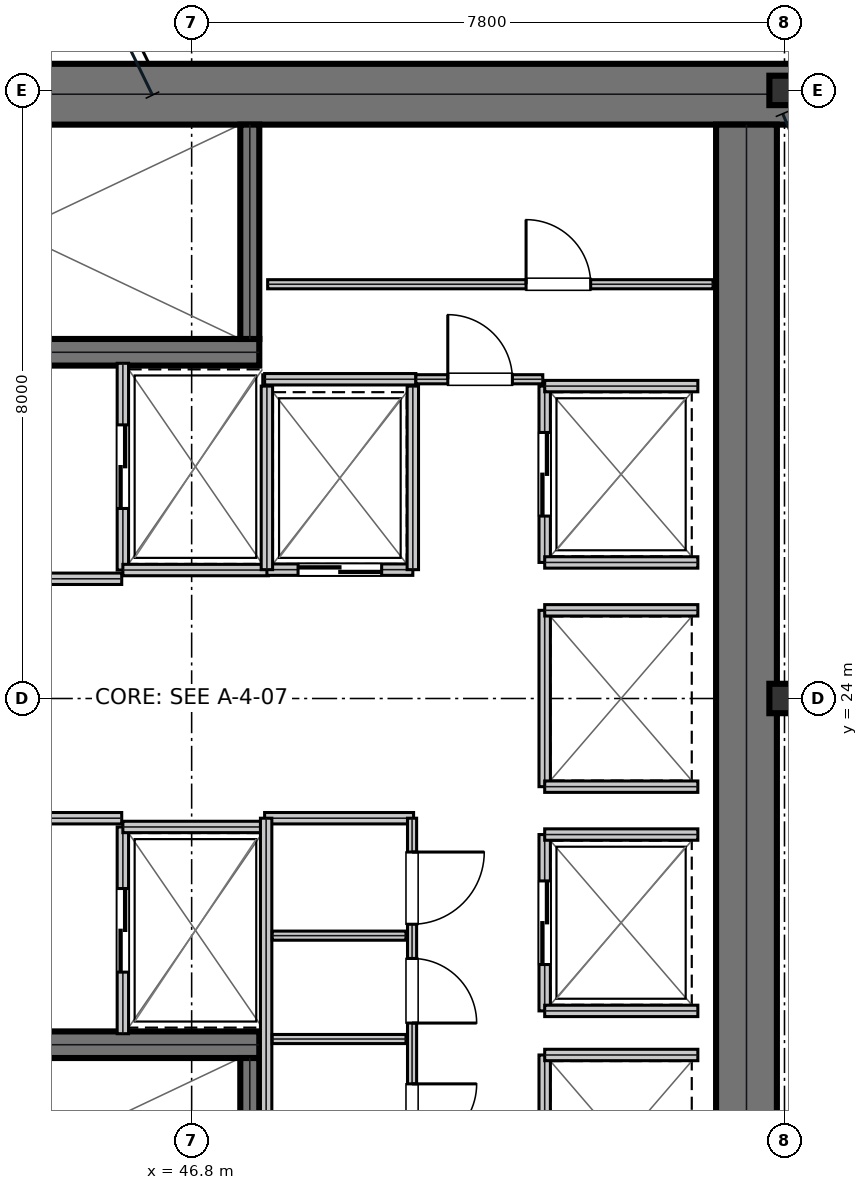
"""IFC4 building model, lengths in metres.
Left out: names, types, materials, properties, quantities, classifications, styles, units other than length and angle.
Written with IfcOpenShell. Run it as: python <this file> out.ifc"""

import sys

from ifc_helpers import new_model, si_unit, direction, frame, frame_2d, origin, origin_2d, place, context, subcontext, project, spatial, rectangle, i_section, extrude, element, fill, save


model = new_model("IFC4")
c1 = context("Model", 3, precision=1e-05, world=origin(), true_north=direction((0.0, 1.0)))
c2 = subcontext(c1, "Body", "Model", "MODEL_VIEW")
j1 = project(units=[si_unit("LENGTHUNIT", "METRE"), si_unit("PLANEANGLEUNIT", "RADIAN")], contexts=[c1])
p1 = place(None, origin())
s1 = spatial("IfcSite", under=j1, at=p1, CompositionType="ELEMENT")
p2 = place(p1, origin())
s2 = spatial("IfcBuilding", under=s1, at=p2, CompositionType="ELEMENT")
p3 = place(p2, frame((0.0, 0.0, 120.9)))
s3 = spatial("IfcBuildingStorey", under=s2, at=p3, CompositionType="ELEMENT", Elevation=120.9)
p4 = place(p3, frame((38.8, 31.95, 0.0), z_axis=(0.0, 0.0, 1.0), x_axis=(1.0, 0.0, 0.0)))
e1 = element("IfcWall", 1, at=p4, inside=s3, PredefinedType="SHEAR", context=c2, shape_type="SweptSolid", body=[
    extrude(rectangle(XDim=16.0, YDim=0.8, at=frame_2d((8.0, 0.0))), origin(), (0.0, 0.0, 1.0), 3.81),
])
p5 = place(p3, frame((54.1, 16.45, 0.0), z_axis=(0.0, 0.0, 1.0), x_axis=(0.0, 1.0, 0.0)))
e2 = element("IfcWall", 2, at=p5, inside=s3, PredefinedType="SHEAR", context=c2, shape_type="SweptSolid", body=[
    extrude(rectangle(XDim=15.1, YDim=0.8, at=frame_2d((7.55, 0.0))), origin(), (0.0, 0.0, 1.0), 3.81),
])
p6 = place(p3, frame((39.98, 28.555, 0.0), z_axis=(0.0, 0.0, 1.0), x_axis=(1.0, 0.0, 0.0)))
e3 = element("IfcWall", 3, at=p6, inside=s3, PredefinedType="SHEAR", context=c2, shape_type="SweptSolid", body=[
    extrude(rectangle(XDim=7.71, YDim=0.35, at=frame_2d((3.855, 0.0))), origin(), (0.0, 0.0, 1.0), 3.81),
])
p7 = place(p6, frame((0.25, 0.0, 0.0)))
e4 = element("IfcOpeningElement", 4, at=p7, cuts=e3, PredefinedType="OPENING", context=c2, shape_type="SweptSolid", body=[
    extrude(rectangle(XDim=1.1, YDim=2.15, at=frame_2d((0.55, 1.075))), frame((0.0, 0.185, 0.0), z_axis=(0.0, -1.0, 0.0), x_axis=(1.0, 0.0, 0.0)), (0.0, 0.0, 1.0), 0.37),
])
p8 = place(p3, frame((39.98, 19.445, 0.0), z_axis=(0.0, 0.0, 1.0), x_axis=(1.0, 0.0, 0.0)))
e5 = element("IfcWall", 5, at=p8, inside=s3, PredefinedType="SHEAR", context=c2, shape_type="SweptSolid", body=[
    extrude(rectangle(XDim=7.71, YDim=0.35, at=frame_2d((3.855, 0.0))), origin(), (0.0, 0.0, 1.0), 3.81),
])
p9 = place(p8, frame((0.25, 0.0, 0.0)))
e6 = element("IfcOpeningElement", 6, at=p9, cuts=e5, PredefinedType="OPENING", context=c2, shape_type="SweptSolid", body=[
    extrude(rectangle(XDim=1.1, YDim=2.15, at=frame_2d((0.55, 1.075))), frame((0.0, 0.185, 0.0), z_axis=(0.0, -1.0, 0.0), x_axis=(1.0, 0.0, 0.0)), (0.0, 0.0, 1.0), 0.37),
])
for number, where, z_axis, x_axis in (
    (7, (47.565, 28.73, 0.0), (0.0, 0.0, 1.0), (0.0, 1.0, 0.0)),
    (8, (47.565, 16.45, 0.0), (0.0, 0.0, 1.0), (0.0, 1.0, 0.0)),
):
    element("IfcWall", number, at=place(p3, frame(where, z_axis=z_axis, x_axis=x_axis)), inside=s3, PredefinedType="SHEAR", context=c2, shape_type="SweptSolid", body=[
        extrude(rectangle(XDim=2.82, YDim=0.25, at=frame_2d((1.41, 0.0))), origin(), (0.0, 0.0, 1.0), 3.81),
    ])
for number, where, z_axis, x_axis in (
    (9, (54.6, 24.0, 0.0), (0.0, 0.0, 1.0), (1.0, 0.0, 0.0)),
    (10, (54.6, 32.0, 0.0), (0.0, 0.0, 1.0), (1.0, 0.0, 0.0)),
):
    element("IfcColumn", number, at=place(p3, frame(where, z_axis=z_axis, x_axis=x_axis)), inside=s3, PredefinedType="COLUMN", context=c2, shape_type="SweptSolid", body=[
        extrude(i_section(OverallWidth=0.398, OverallDepth=0.387, WebThickness=0.021, FlangeThickness=0.033, at=origin_2d()), origin(), (0.0, 0.0, 1.0), 4.044),
    ])
p10 = place(p3, frame((39.98, 25.575, 0.0), z_axis=(0.0, 0.0, 1.0), x_axis=(1.0, 0.0, 0.0)))
e11 = element("IfcWall", 11, at=p10, inside=s3, PredefinedType="PARTITIONING", context=c2, shape_type="SweptSolid", body=[
    extrude(rectangle(XDim=5.9, YDim=0.15, at=frame_2d((2.95, 0.0))), origin(), (0.0, 0.0, 1.0), 3.81),
])
p11 = place(p10, frame((2.35, 0.0, 0.0)))
e12 = element("IfcOpeningElement", 12, at=p11, cuts=e11, PredefinedType="OPENING", context=c2, shape_type="SweptSolid", body=[
    extrude(rectangle(XDim=1.05, YDim=2.15, at=frame_2d((0.525, 1.075))), frame((0.0, 0.085, 0.0), z_axis=(0.0, -1.0, 0.0), x_axis=(1.0, 0.0, 0.0)), (0.0, 0.0, 1.0), 0.17),
])
p12 = place(p3, frame((39.98, 22.425, 0.0), z_axis=(0.0, 0.0, 1.0), x_axis=(1.0, 0.0, 0.0)))
e13 = element("IfcWall", 13, at=p12, inside=s3, PredefinedType="PARTITIONING", context=c2, shape_type="SweptSolid", body=[
    extrude(rectangle(XDim=5.9, YDim=0.15, at=frame_2d((2.95, 0.0))), origin(), (0.0, 0.0, 1.0), 3.81),
])
p13 = place(p12, frame((2.35, 0.0, 0.0)))
e14 = element("IfcOpeningElement", 14, at=p13, cuts=e13, PredefinedType="OPENING", context=c2, shape_type="SweptSolid", body=[
    extrude(rectangle(XDim=1.05, YDim=2.15, at=frame_2d((0.525, 1.075))), frame((0.0, 0.085, 0.0), z_axis=(0.0, -1.0, 0.0), x_axis=(1.0, 0.0, 0.0)), (0.0, 0.0, 1.0), 0.17),
])
p14 = place(p3, frame((45.895, 25.69, 0.0), z_axis=(0.0, 0.0, 1.0), x_axis=(0.0, 1.0, 0.0)))
e15 = element("IfcWall", 15, at=p14, inside=s3, PredefinedType="PARTITIONING", context=c2, shape_type="SweptSolid", body=[
    extrude(rectangle(XDim=2.72, YDim=0.15, at=frame_2d((1.36, 0.0))), origin(), (0.0, 0.0, 1.0), 3.81),
])
p15 = place(p14, frame((0.81, 0.0, 0.0)))
e16 = element("IfcOpeningElement", 16, at=p15, cuts=e15, PredefinedType="OPENING", context=c2, shape_type="SweptSolid", body=[
    extrude(rectangle(XDim=1.1, YDim=2.15, at=frame_2d((0.55, 1.075))), frame((0.0, 0.085, 0.0), z_axis=(0.0, -1.0, 0.0), x_axis=(1.0, 0.0, 0.0)), (0.0, 0.0, 1.0), 0.17),
])
p16 = place(p3, frame((45.895, 25.69, 0.0), z_axis=(0.0, 0.0, 1.0), x_axis=(1.0, 0.0, 0.0)))
e17 = element("IfcWall", 17, at=p16, inside=s3, PredefinedType="PARTITIONING", context=c2, shape_type="SweptSolid", body=[
    extrude(rectangle(XDim=1.915, YDim=0.15, at=frame_2d((0.958, 0.0))), origin(), (0.0, 0.0, 1.0), 3.81),
])
p17 = place(p3, frame((45.895, 19.59, 0.0), z_axis=(0.0, 0.0, 1.0), x_axis=(0.0, 1.0, 0.0)))
e18 = element("IfcWall", 18, at=p17, inside=s3, PredefinedType="PARTITIONING", context=c2, shape_type="SweptSolid", body=[
    extrude(rectangle(XDim=2.72, YDim=0.15, at=frame_2d((1.36, 0.0))), origin(), (0.0, 0.0, 1.0), 3.81),
])
p18 = place(p17, frame((0.81, 0.0, 0.0)))
e19 = element("IfcOpeningElement", 19, at=p18, cuts=e18, PredefinedType="OPENING", context=c2, shape_type="SweptSolid", body=[
    extrude(rectangle(XDim=1.1, YDim=2.15, at=frame_2d((0.55, 1.075))), frame((0.0, 0.085, 0.0), z_axis=(0.0, -1.0, 0.0), x_axis=(1.0, 0.0, 0.0)), (0.0, 0.0, 1.0), 0.17),
])
p19 = place(p3, frame((45.895, 22.31, 0.0), z_axis=(0.0, 0.0, 1.0), x_axis=(1.0, 0.0, 0.0)))
e20 = element("IfcWall", 20, at=p19, inside=s3, PredefinedType="PARTITIONING", context=c2, shape_type="SweptSolid", body=[
    extrude(rectangle(XDim=1.915, YDim=0.15, at=frame_2d((0.958, 0.0))), origin(), (0.0, 0.0, 1.0), 3.81),
])
p20 = place(p3, frame((47.79, 25.695, 0.0), z_axis=(0.0, 0.0, 1.0), x_axis=(1.0, 0.0, 0.0)))
e21 = element("IfcWall", 21, at=p20, inside=s3, PredefinedType="PARTITIONING", context=c2, shape_type="SweptSolid", body=[
    extrude(rectangle(XDim=1.92, YDim=0.15, at=frame_2d((0.96, 0.0))), origin(), (0.0, 0.0, 1.0), 3.81),
])
p21 = place(p20, frame((0.41, 0.0, 0.0)))
e22 = element("IfcOpeningElement", 22, at=p21, cuts=e21, PredefinedType="OPENING", context=c2, shape_type="SweptSolid", body=[
    extrude(rectangle(XDim=1.1, YDim=2.15, at=frame_2d((0.55, 1.075))), frame((0.0, 0.085, 0.0), z_axis=(0.0, -1.0, 0.0), x_axis=(1.0, 0.0, 0.0)), (0.0, 0.0, 1.0), 0.17),
])
for number, where, z_axis, x_axis in (
    (23, (47.79, 25.695, 0.0), (0.0, 0.0, 1.0), (0.0, 1.0, 0.0)),
    (24, (49.71, 25.695, 0.0), (0.0, 0.0, 1.0), (0.0, 1.0, 0.0)),
):
    element("IfcWall", number, at=place(p3, frame(where, z_axis=z_axis, x_axis=x_axis)), inside=s3, PredefinedType="PARTITIONING", context=c2, shape_type="SweptSolid", body=[
        extrude(rectangle(XDim=2.415, YDim=0.15, at=frame_2d((1.208, 0.0))), origin(), (0.0, 0.0, 1.0), 3.81),
    ])
p22 = place(p3, frame((51.445, 25.79, 0.0), z_axis=(0.0, 0.0, 1.0), x_axis=(0.0, 1.0, 0.0)))
e25 = element("IfcWall", 25, at=p22, inside=s3, PredefinedType="PARTITIONING", context=c2, shape_type="SweptSolid", body=[
    extrude(rectangle(XDim=2.32, YDim=0.15, at=frame_2d((1.16, 0.0))), origin(), (0.0, 0.0, 1.0), 3.81),
])
p23 = place(p22, frame((0.61, 0.0, 0.0)))
e26 = element("IfcOpeningElement", 26, at=p23, cuts=e25, PredefinedType="OPENING", context=c2, shape_type="SweptSolid", body=[
    extrude(rectangle(XDim=1.1, YDim=2.15, at=frame_2d((0.55, 1.075))), frame((0.0, 0.085, 0.0), z_axis=(0.0, -1.0, 0.0), x_axis=(1.0, 0.0, 0.0)), (0.0, 0.0, 1.0), 0.17),
])
for number, where, z_axis, x_axis in (
    (27, (51.445, 25.79, 0.0), (0.0, 0.0, 1.0), (1.0, 0.0, 0.0)),
    (28, (51.445, 28.11, 0.0), (0.0, 0.0, 1.0), (1.0, 0.0, 0.0)),
):
    element("IfcWall", number, at=place(p3, frame(where, z_axis=z_axis, x_axis=x_axis)), inside=s3, PredefinedType="PARTITIONING", context=c2, shape_type="SweptSolid", body=[
        extrude(rectangle(XDim=2.015, YDim=0.15, at=frame_2d((1.007, 0.0))), origin(), (0.0, 0.0, 1.0), 3.81),
    ])
p24 = place(p3, frame((51.445, 19.89, 0.0), z_axis=(0.0, 0.0, 1.0), x_axis=(0.0, 1.0, 0.0)))
e29 = element("IfcWall", 29, at=p24, inside=s3, PredefinedType="PARTITIONING", context=c2, shape_type="SweptSolid", body=[
    extrude(rectangle(XDim=2.32, YDim=0.15, at=frame_2d((1.16, 0.0))), origin(), (0.0, 0.0, 1.0), 3.81),
])
p25 = place(p24, frame((0.61, 0.0, 0.0)))
e30 = element("IfcOpeningElement", 30, at=p25, cuts=e29, PredefinedType="OPENING", context=c2, shape_type="SweptSolid", body=[
    extrude(rectangle(XDim=1.1, YDim=2.15, at=frame_2d((0.55, 1.075))), frame((0.0, 0.085, 0.0), z_axis=(0.0, -1.0, 0.0), x_axis=(1.0, 0.0, 0.0)), (0.0, 0.0, 1.0), 0.17),
])
for number, where, z_axis, x_axis in (
    (31, (51.445, 19.89, 0.0), (0.0, 0.0, 1.0), (1.0, 0.0, 0.0)),
    (32, (51.445, 22.21, 0.0), (0.0, 0.0, 1.0), (1.0, 0.0, 0.0)),
):
    element("IfcWall", number, at=place(p3, frame(where, z_axis=z_axis, x_axis=x_axis)), inside=s3, PredefinedType="PARTITIONING", context=c2, shape_type="SweptSolid", body=[
        extrude(rectangle(XDim=2.015, YDim=0.15, at=frame_2d((1.007, 0.0))), origin(), (0.0, 0.0, 1.0), 3.81),
    ])
p26 = place(p3, frame((51.445, 22.84, 0.0), z_axis=(0.0, 0.0, 1.0), x_axis=(0.0, 1.0, 0.0)))
e33 = element("IfcWall", 33, at=p26, inside=s3, PredefinedType="PARTITIONING", context=c2, shape_type="SweptSolid", body=[
    extrude(rectangle(XDim=2.32, YDim=0.15, at=frame_2d((1.16, 0.0))), origin(), (0.0, 0.0, 1.0), 3.81),
])
for number, where, z_axis, x_axis in (
    (34, (51.445, 22.84, 0.0), (0.0, 0.0, 1.0), (1.0, 0.0, 0.0)),
    (35, (51.445, 25.16, 0.0), (0.0, 0.0, 1.0), (1.0, 0.0, 0.0)),
):
    element("IfcWall", number, at=place(p3, frame(where, z_axis=z_axis, x_axis=x_axis)), inside=s3, PredefinedType="PARTITIONING", context=c2, shape_type="SweptSolid", body=[
        extrude(rectangle(XDim=2.015, YDim=0.15, at=frame_2d((1.007, 0.0))), origin(), (0.0, 0.0, 1.0), 3.81),
    ])
p27 = place(p3, frame((51.445, 16.99, 0.0), z_axis=(0.0, 0.0, 1.0), x_axis=(0.0, 1.0, 0.0)))
e36 = element("IfcWall", 36, at=p27, inside=s3, PredefinedType="PARTITIONING", context=c2, shape_type="SweptSolid", body=[
    extrude(rectangle(XDim=2.32, YDim=0.15, at=frame_2d((1.16, 0.0))), origin(), (0.0, 0.0, 1.0), 3.81),
])
p28 = place(p3, frame((51.445, 19.31, 0.0), z_axis=(0.0, 0.0, 1.0), x_axis=(1.0, 0.0, 0.0)))
e37 = element("IfcWall", 37, at=p28, inside=s3, PredefinedType="PARTITIONING", context=c2, shape_type="SweptSolid", body=[
    extrude(rectangle(XDim=2.015, YDim=0.15, at=frame_2d((1.007, 0.0))), origin(), (0.0, 0.0, 1.0), 3.81),
])
p29 = place(p3, frame((47.76, 22.425, 0.0), z_axis=(0.0, 0.0, 1.0), x_axis=(1.0, 0.0, 0.0)))
e38 = element("IfcWall", 38, at=p29, inside=s3, PredefinedType="PARTITIONING", context=c2, shape_type="SweptSolid", body=[
    extrude(rectangle(XDim=1.96, YDim=0.15, at=frame_2d((0.98, 0.0))), origin(), (0.0, 0.0, 1.0), 3.81),
])
p30 = place(p3, frame((47.78, 16.45, 0.0), z_axis=(0.0, 0.0, 1.0), x_axis=(0.0, 1.0, 0.0)))
e39 = element("IfcWall", 39, at=p30, inside=s3, PredefinedType="PARTITIONING", context=c2, shape_type="SweptSolid", body=[
    extrude(rectangle(XDim=5.975, YDim=0.15, at=frame_2d((2.988, 0.0))), origin(), (0.0, 0.0, 1.0), 3.81),
])
for number, where, z_axis, x_axis in (
    (40, (47.86, 19.52, 0.0), (0.0, 0.0, 1.0), (1.0, 0.0, 0.0)),
    (41, (47.86, 20.88, 0.0), (0.0, 0.0, 1.0), (1.0, 0.0, 0.0)),
):
    element("IfcWall", number, at=place(p3, frame(where, z_axis=z_axis, x_axis=x_axis)), inside=s3, PredefinedType="PARTITIONING", context=c2, shape_type="SweptSolid", body=[
        extrude(rectangle(XDim=1.76, YDim=0.12, at=frame_2d((0.88, 0.0))), origin(), (0.0, 0.0, 1.0), 3.81),
    ])
p31 = place(p3, frame((49.7, 16.48, 0.0), z_axis=(0.0, 0.0, 1.0), x_axis=(0.0, 1.0, 0.0)))
e42 = element("IfcWall", 42, at=p31, inside=s3, PredefinedType="PARTITIONING", context=c2, shape_type="SweptSolid", body=[
    extrude(rectangle(XDim=5.945, YDim=0.12, at=frame_2d((2.973, 0.0))), origin(), (0.0, 0.0, 1.0), 3.81),
])
p32 = place(p31, frame((1.6, 0.0, 0.0)))
e43 = element("IfcOpeningElement", 43, at=p32, cuts=e42, PredefinedType="OPENING", context=c2, shape_type="SweptSolid", body=[
    extrude(rectangle(XDim=0.85, YDim=2.15, at=frame_2d((0.425, 1.075))), frame((0.0, 0.07, 0.0), z_axis=(0.0, -1.0, 0.0), x_axis=(1.0, 0.0, 0.0)), (0.0, 0.0, 1.0), 0.14),
])
p33 = place(p31, frame((3.25, 0.0, 0.0)))
e44 = element("IfcOpeningElement", 44, at=p33, cuts=e42, PredefinedType="OPENING", context=c2, shape_type="SweptSolid", body=[
    extrude(rectangle(XDim=0.85, YDim=2.15, at=frame_2d((0.425, 1.075))), frame((0.0, 0.07, 0.0), z_axis=(0.0, -1.0, 0.0), x_axis=(1.0, 0.0, 0.0)), (0.0, 0.0, 1.0), 0.14),
])
p34 = place(p31, frame((4.55, 0.0, 0.0)))
e45 = element("IfcOpeningElement", 45, at=p34, cuts=e42, PredefinedType="OPENING", context=c2, shape_type="SweptSolid", body=[
    extrude(rectangle(XDim=0.95, YDim=2.15, at=frame_2d((0.475, 1.075))), frame((0.0, 0.07, 0.0), z_axis=(0.0, -1.0, 0.0), x_axis=(1.0, 0.0, 0.0)), (0.0, 0.0, 1.0), 0.14),
])
p35 = place(p3, frame((47.76, 28.2, 0.0), z_axis=(0.0, 0.0, 1.0), x_axis=(1.0, 0.0, 0.0)))
e46 = element("IfcWall", 46, at=p35, inside=s3, PredefinedType="PARTITIONING", context=c2, shape_type="SweptSolid", body=[
    extrude(rectangle(XDim=1.99, YDim=0.15, at=frame_2d((0.995, 0.0))), origin(), (0.0, 0.0, 1.0), 3.81),
])
p36 = place(p3, frame((49.75, 28.2, 0.0), z_axis=(0.0, 0.0, 1.0), x_axis=(1.0, 0.0, 0.0)))
e47 = element("IfcWall", 47, at=p36, inside=s3, PredefinedType="PARTITIONING", context=c2, shape_type="SweptSolid", body=[
    extrude(rectangle(XDim=1.67, YDim=0.12, at=frame_2d((0.835, 0.0))), origin(), (0.0, 0.0, 1.0), 3.81),
])
p37 = place(p36, frame((0.42, 0.0, 0.0)))
e48 = element("IfcOpeningElement", 48, at=p37, cuts=e47, PredefinedType="OPENING", context=c2, shape_type="SweptSolid", body=[
    extrude(rectangle(XDim=0.85, YDim=2.15, at=frame_2d((0.425, 1.075))), frame((0.0, 0.07, 0.0), z_axis=(0.0, -1.0, 0.0), x_axis=(1.0, 0.0, 0.0)), (0.0, 0.0, 1.0), 0.14),
])
p38 = place(p3, frame((47.8, 29.45, 0.0), z_axis=(0.0, 0.0, 1.0), x_axis=(1.0, 0.0, 0.0)))
e49 = element("IfcWall", 49, at=p38, inside=s3, PredefinedType="PARTITIONING", context=c2, shape_type="SweptSolid", body=[
    extrude(rectangle(XDim=5.86, YDim=0.12, at=frame_2d((2.93, 0.0))), origin(), (0.0, 0.0, 1.0), 3.81),
])
p39 = place(p38, frame((3.4, 0.0, 0.0)))
e50 = element("IfcOpeningElement", 50, at=p39, cuts=e49, PredefinedType="OPENING", context=c2, shape_type="SweptSolid", body=[
    extrude(rectangle(XDim=0.85, YDim=2.15, at=frame_2d((0.425, 1.075))), frame((0.0, 0.07, 0.0), z_axis=(0.0, -1.0, 0.0), x_axis=(1.0, 0.0, 0.0)), (0.0, 0.0, 1.0), 0.14),
])
p40 = place(p15, frame((1.1, 0.0, 0.0), z_axis=(0.0, 0.0, 1.0), x_axis=(-1.0, 0.0, 0.0)))
e51 = element("IfcDoor", 51, at=p40, inside=s3, OperationType="DOUBLE_DOOR_SLIDING", PredefinedType="DOOR", context=c2, shape_type="SweptSolid", body=[
    extrude(rectangle(XDim=1.1, YDim=2.15, at=frame_2d((0.55, 1.075))), frame((0.0, 0.025, 0.0), z_axis=(0.0, -1.0, 0.0), x_axis=(1.0, 0.0, 0.0)), (0.0, 0.0, 1.0), 0.05),
])
fill(e16, e51)
p41 = place(p18, frame((1.1, 0.0, 0.0), z_axis=(0.0, 0.0, 1.0), x_axis=(-1.0, 0.0, 0.0)))
e52 = element("IfcDoor", 52, at=p41, inside=s3, OperationType="DOUBLE_DOOR_SLIDING", PredefinedType="DOOR", context=c2, shape_type="SweptSolid", body=[
    extrude(rectangle(XDim=1.1, YDim=2.15, at=frame_2d((0.55, 1.075))), frame((0.0, 0.025, 0.0), z_axis=(0.0, -1.0, 0.0), x_axis=(1.0, 0.0, 0.0)), (0.0, 0.0, 1.0), 0.05),
])
fill(e19, e52)
p42 = place(p21, frame((1.1, 0.0, 0.0), z_axis=(0.0, 0.0, 1.0), x_axis=(-1.0, 0.0, 0.0)))
e53 = element("IfcDoor", 53, at=p42, inside=s3, OperationType="DOUBLE_DOOR_SLIDING", PredefinedType="DOOR", context=c2, shape_type="SweptSolid", body=[
    extrude(rectangle(XDim=1.1, YDim=2.15, at=frame_2d((0.55, 1.075))), frame((0.0, 0.025, 0.0), z_axis=(0.0, -1.0, 0.0), x_axis=(1.0, 0.0, 0.0)), (0.0, 0.0, 1.0), 0.05),
])
fill(e22, e53)
p43 = place(p23, frame((1.1, 0.0, 0.0), z_axis=(0.0, 0.0, 1.0), x_axis=(-1.0, 0.0, 0.0)))
e54 = element("IfcDoor", 54, at=p43, inside=s3, OperationType="DOUBLE_DOOR_SLIDING", PredefinedType="DOOR", context=c2, shape_type="SweptSolid", body=[
    extrude(rectangle(XDim=1.1, YDim=2.15, at=frame_2d((0.55, 1.075))), frame((0.0, 0.025, 0.0), z_axis=(0.0, -1.0, 0.0), x_axis=(1.0, 0.0, 0.0)), (0.0, 0.0, 1.0), 0.05),
])
fill(e26, e54)
p44 = place(p25, frame((1.1, 0.0, 0.0), z_axis=(0.0, 0.0, 1.0), x_axis=(-1.0, 0.0, 0.0)))
e55 = element("IfcDoor", 55, at=p44, inside=s3, OperationType="DOUBLE_DOOR_SLIDING", PredefinedType="DOOR", context=c2, shape_type="SweptSolid", body=[
    extrude(rectangle(XDim=1.1, YDim=2.15, at=frame_2d((0.55, 1.075))), frame((0.0, 0.025, 0.0), z_axis=(0.0, -1.0, 0.0), x_axis=(1.0, 0.0, 0.0)), (0.0, 0.0, 1.0), 0.05),
])
fill(e30, e55)
p45 = place(p32, frame((0.85, 0.0, 0.0), z_axis=(0.0, 0.0, 1.0), x_axis=(-1.0, 0.0, 0.0)))
e56 = element("IfcDoor", 56, at=p45, inside=s3, OperationType="SINGLE_SWING_LEFT", PredefinedType="DOOR", context=c2, shape_type="SweptSolid", body=[
    extrude(rectangle(XDim=0.85, YDim=2.15, at=frame_2d((0.425, 1.075))), frame((0.0, 0.025, 0.0), z_axis=(0.0, -1.0, 0.0), x_axis=(1.0, 0.0, 0.0)), (0.0, 0.0, 1.0), 0.05),
])
fill(e43, e56)
p46 = place(p33, frame((0.85, 0.0, 0.0), z_axis=(0.0, 0.0, 1.0), x_axis=(-1.0, 0.0, 0.0)))
e57 = element("IfcDoor", 57, at=p46, inside=s3, OperationType="SINGLE_SWING_RIGHT", PredefinedType="DOOR", context=c2, shape_type="SweptSolid", body=[
    extrude(rectangle(XDim=0.85, YDim=2.15, at=frame_2d((0.425, 1.075))), frame((0.0, 0.025, 0.0), z_axis=(0.0, -1.0, 0.0), x_axis=(1.0, 0.0, 0.0)), (0.0, 0.0, 1.0), 0.05),
])
fill(e44, e57)
p47 = place(p34, frame((0.95, 0.0, 0.0), z_axis=(0.0, 0.0, 1.0), x_axis=(-1.0, 0.0, 0.0)))
e58 = element("IfcDoor", 58, at=p47, inside=s3, OperationType="SINGLE_SWING_LEFT", PredefinedType="DOOR", context=c2, shape_type="SweptSolid", body=[
    extrude(rectangle(XDim=0.95, YDim=2.15, at=frame_2d((0.475, 1.075))), frame((0.0, 0.025, 0.0), z_axis=(0.0, -1.0, 0.0), x_axis=(1.0, 0.0, 0.0)), (0.0, 0.0, 1.0), 0.05),
])
fill(e45, e58)
p48 = place(p37, origin())
e59 = element("IfcDoor", 59, at=p48, inside=s3, OperationType="SINGLE_SWING_LEFT", PredefinedType="DOOR", context=c2, shape_type="SweptSolid", body=[
    extrude(rectangle(XDim=0.85, YDim=2.15, at=frame_2d((0.425, 1.075))), frame((0.0, 0.025, 0.0), z_axis=(0.0, -1.0, 0.0), x_axis=(1.0, 0.0, 0.0)), (0.0, 0.0, 1.0), 0.05),
])
fill(e48, e59)
p49 = place(p39, origin())
e60 = element("IfcDoor", 60, at=p49, inside=s3, OperationType="SINGLE_SWING_LEFT", PredefinedType="DOOR", context=c2, shape_type="SweptSolid", body=[
    extrude(rectangle(XDim=0.85, YDim=2.15, at=frame_2d((0.425, 1.075))), frame((0.0, 0.025, 0.0), z_axis=(0.0, -1.0, 0.0), x_axis=(1.0, 0.0, 0.0)), (0.0, 0.0, 1.0), 0.05),
])
fill(e50, e60)
save(model, sys.argv[1])
